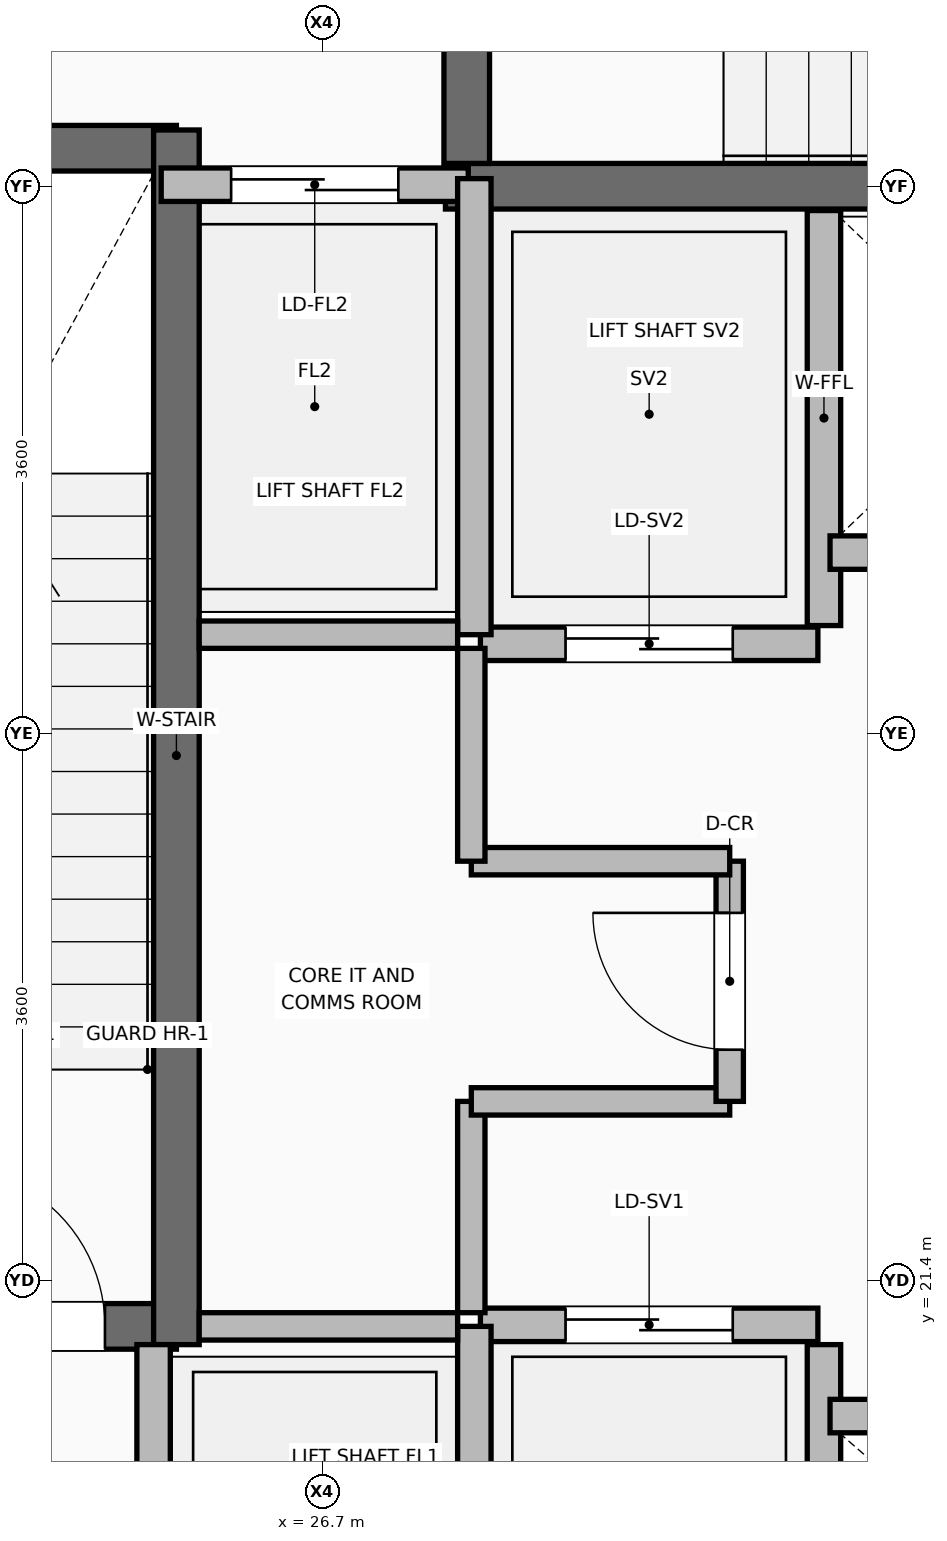
"""IFC4 building model, lengths in metres.
Left out: names, types, materials, properties, quantities, classifications, styles, units other than length and angle.
Written with IfcOpenShell. Run it as: python <this file> out.ifc"""

import sys

from ifc_helpers import new_model, si_unit, direction, frame, frame_2d, origin, place, context, subcontext, project, spatial, rectangle, extrude, element, fill, save


model = new_model("IFC4")
c1 = context("Model", 3, precision=1e-05, world=origin(), true_north=direction((0.0, 1.0)))
c2 = subcontext(c1, "Body", "Model", "MODEL_VIEW")
j1 = project(units=[si_unit("LENGTHUNIT", "METRE"), si_unit("PLANEANGLEUNIT", "RADIAN")], contexts=[c1])
p1 = place(None, origin())
s1 = spatial("IfcSite", under=j1, at=p1, CompositionType="ELEMENT")
p2 = place(p1, origin())
s2 = spatial("IfcBuilding", under=s1, at=p2, CompositionType="ELEMENT")
p3 = place(p2, frame((0.0, 0.0, 175.95)))
s3 = spatial("IfcBuildingStorey", under=s2, at=p3, CompositionType="ELEMENT", Elevation=175.95)
p4 = place(p3, frame((30.0, 18.08, 0.0), z_axis=(0.0, 0.0, 1.0), x_axis=(0.0, 1.0, 0.0)))
e1 = element("IfcWall", 1, at=p4, inside=s3, PredefinedType="PARTITIONING", context=c2, shape_type="SweptSolid", body=[
    extrude(rectangle(XDim=2.9, YDim=0.22, at=frame_2d((1.45, 0.0))), origin(), (0.0, 0.0, 1.0), 5.195),
])
p5 = place(p3, frame((30.0, 25.71, 0.0), z_axis=(0.0, 0.0, 1.0), x_axis=(0.0, 1.0, 0.0)))
e2 = element("IfcWall", 2, at=p5, inside=s3, PredefinedType="PARTITIONING", context=c2, shape_type="SweptSolid", body=[
    extrude(rectangle(XDim=2.73, YDim=0.22, at=frame_2d((1.365, 0.0))), origin(), (0.0, 0.0, 1.0), 5.195),
])
p6 = place(p3, frame((22.175, 21.1, 0.0), z_axis=(0.0, 0.0, 1.0), x_axis=(1.0, 0.0, 0.0)))
e3 = element("IfcWall", 3, at=p6, inside=s3, PredefinedType="SHEAR", context=c2, shape_type="SweptSolid", body=[
    extrude(rectangle(XDim=3.565, YDim=0.3, at=frame_2d((1.782, 0.0))), origin(), (0.0, 0.0, 1.0), 5.22),
])
p7 = place(p6, frame((2.045, 0.0, 0.0)))
e4 = element("IfcOpeningElement", 4, at=p7, cuts=e3, PredefinedType="OPENING", context=c2, shape_type="SweptSolid", body=[
    extrude(rectangle(XDim=1.05, YDim=2.1, at=frame_2d((0.525, 1.05))), frame((0.0, 0.16, 0.0), z_axis=(0.0, -1.0, 0.0), x_axis=(1.0, 0.0, 0.0)), (0.0, 0.0, 1.0), 0.32),
])
p8 = place(p3, frame((22.175, 28.85, 0.0), z_axis=(0.0, 0.0, 1.0), x_axis=(1.0, 0.0, 0.0)))
e5 = element("IfcWall", 5, at=p8, inside=s3, PredefinedType="SHEAR", context=c2, shape_type="SweptSolid", body=[
    extrude(rectangle(XDim=3.565, YDim=0.3, at=frame_2d((1.782, 0.0))), origin(), (0.0, 0.0, 1.0), 5.22),
])
p9 = place(p3, frame((25.74, 20.98, 0.0), z_axis=(0.0, 0.0, 1.0), x_axis=(0.0, 1.0, 0.0)))
e6 = element("IfcWall", 6, at=p9, inside=s3, PredefinedType="SHEAR", context=c2, shape_type="SweptSolid", body=[
    extrude(rectangle(XDim=7.99, YDim=0.3, at=frame_2d((3.995, 0.0))), origin(), (0.0, 0.0, 1.0), 5.22),
])
p10 = place(p3, frame((27.51, 28.6, 0.0), z_axis=(0.0, 0.0, 1.0), x_axis=(1.0, 0.0, 0.0)))
e7 = element("IfcWall", 7, at=p10, inside=s3, PredefinedType="SHEAR", context=c2, shape_type="SweptSolid", body=[
    extrude(rectangle(XDim=8.03, YDim=0.3, at=frame_2d((4.015, 0.0))), origin(), (0.0, 0.0, 1.0), 5.22),
])
p11 = place(p3, frame((27.65, 28.75, 0.0), z_axis=(0.0, 0.0, 1.0), x_axis=(0.0, 1.0, 0.0)))
e8 = element("IfcWall", 8, at=p11, inside=s3, PredefinedType="SHEAR", context=c2, shape_type="SweptSolid", body=[
    extrude(rectangle(XDim=3.425, YDim=0.3, at=frame_2d((1.712, 0.0))), origin(), (0.0, 0.0, 1.0), 5.22),
])
p12 = place(p11, frame((1.0, 0.0, 0.0)))
e9 = element("IfcOpeningElement", 9, at=p12, cuts=e8, PredefinedType="OPENING", context=c2, shape_type="SweptSolid", body=[
    extrude(rectangle(XDim=1.05, YDim=2.1, at=frame_2d((0.525, 1.05))), frame((0.0, 0.16, 0.0), z_axis=(0.0, -1.0, 0.0), x_axis=(1.0, 0.0, 0.0)), (0.0, 0.0, 1.0), 0.32),
])
p13 = place(p3, frame((25.59, 18.22, 0.0), z_axis=(0.0, 0.0, 1.0), x_axis=(0.0, 1.0, 0.0)))
e10 = element("IfcWall", 10, at=p13, inside=s3, PredefinedType="PARTITIONING", context=c2, shape_type="SweptSolid", body=[
    extrude(rectangle(XDim=2.76, YDim=0.22, at=frame_2d((1.38, 0.0))), origin(), (0.0, 0.0, 1.0), 5.2),
])
p14 = place(p13, frame((0.83, 0.0, 0.0)))
e11 = element("IfcOpeningElement", 11, at=p14, cuts=e10, PredefinedType="OPENING", context=c2, shape_type="SweptSolid", body=[
    extrude(rectangle(XDim=1.1, YDim=2.2, at=frame_2d((0.55, 1.1))), frame((0.0, 0.12, 0.0), z_axis=(0.0, -1.0, 0.0), x_axis=(1.0, 0.0, 0.0)), (0.0, 0.0, 1.0), 0.24),
])
p15 = place(p3, frame((25.64, 28.61, 0.0), z_axis=(0.0, 0.0, 1.0), x_axis=(1.0, 0.0, 0.0)))
e12 = element("IfcWall", 12, at=p15, inside=s3, PredefinedType="PARTITIONING", context=c2, shape_type="SweptSolid", body=[
    extrude(rectangle(XDim=2.02, YDim=0.22, at=frame_2d((1.01, 0.0))), origin(), (0.0, 0.0, 1.0), 5.2),
])
p16 = place(p15, frame((0.46, 0.0, 0.0)))
e13 = element("IfcOpeningElement", 13, at=p16, cuts=e12, PredefinedType="OPENING", context=c2, shape_type="SweptSolid", body=[
    extrude(rectangle(XDim=1.1, YDim=2.2, at=frame_2d((0.55, 1.1))), frame((0.0, 0.12, 0.0), z_axis=(0.0, -1.0, 0.0), x_axis=(1.0, 0.0, 0.0)), (0.0, 0.0, 1.0), 0.24),
])
p17 = place(p3, frame((27.74, 21.11, 0.0), z_axis=(0.0, 0.0, 1.0), x_axis=(1.0, 0.0, 0.0)))
e14 = element("IfcWall", 14, at=p17, inside=s3, PredefinedType="PARTITIONING", context=c2, shape_type="SweptSolid", body=[
    extrude(rectangle(XDim=2.22, YDim=0.22, at=frame_2d((1.11, 0.0))), origin(), (0.0, 0.0, 1.0), 5.2),
])
p18 = place(p17, frame((0.56, 0.0, 0.0)))
e15 = element("IfcOpeningElement", 15, at=p18, cuts=e14, PredefinedType="OPENING", context=c2, shape_type="SweptSolid", body=[
    extrude(rectangle(XDim=1.1, YDim=2.2, at=frame_2d((0.55, 1.1))), frame((0.0, 0.12, 0.0), z_axis=(0.0, -1.0, 0.0), x_axis=(1.0, 0.0, 0.0)), (0.0, 0.0, 1.0), 0.24),
])
p19 = place(p3, frame((27.74, 25.59, 0.0), z_axis=(0.0, 0.0, 1.0), x_axis=(1.0, 0.0, 0.0)))
e16 = element("IfcWall", 16, at=p19, inside=s3, PredefinedType="PARTITIONING", context=c2, shape_type="SweptSolid", body=[
    extrude(rectangle(XDim=2.22, YDim=0.22, at=frame_2d((1.11, 0.0))), origin(), (0.0, 0.0, 1.0), 5.2),
])
p20 = place(p19, frame((0.56, 0.0, 0.0)))
e17 = element("IfcOpeningElement", 17, at=p20, cuts=e16, PredefinedType="OPENING", context=c2, shape_type="SweptSolid", body=[
    extrude(rectangle(XDim=1.1, YDim=2.2, at=frame_2d((0.55, 1.1))), frame((0.0, 0.12, 0.0), z_axis=(0.0, -1.0, 0.0), x_axis=(1.0, 0.0, 0.0)), (0.0, 0.0, 1.0), 0.24),
])
p21 = place(p3, frame((30.04, 20.51, 0.0), z_axis=(0.0, 0.0, 1.0), x_axis=(1.0, 0.0, 0.0)))
e18 = element("IfcWall", 18, at=p21, inside=s3, PredefinedType="PARTITIONING", context=c2, shape_type="SweptSolid", body=[
    extrude(rectangle(XDim=2.42, YDim=0.22, at=frame_2d((1.21, 0.0))), origin(), (0.0, 0.0, 1.0), 5.2),
])
p22 = place(p3, frame((30.04, 26.19, 0.0), z_axis=(0.0, 0.0, 1.0), x_axis=(1.0, 0.0, 0.0)))
e19 = element("IfcWall", 19, at=p22, inside=s3, PredefinedType="PARTITIONING", context=c2, shape_type="SweptSolid", body=[
    extrude(rectangle(XDim=2.32, YDim=0.22, at=frame_2d((1.16, 0.0))), origin(), (0.0, 0.0, 1.0), 5.2),
])
p23 = place(p3, frame((27.7, 18.15, 0.0), z_axis=(0.0, 0.0, 1.0), x_axis=(0.0, 1.0, 0.0)))
e20 = element("IfcWall", 20, at=p23, inside=s3, PredefinedType="PARTITIONING", context=c2, shape_type="SweptSolid", body=[
    extrude(rectangle(XDim=2.95, YDim=0.22, at=frame_2d((1.475, 0.0))), origin(), (0.0, 0.0, 1.0), 5.2),
])
p24 = place(p3, frame((27.7, 25.65, 0.0), z_axis=(0.0, 0.0, 1.0), x_axis=(0.0, 1.0, 0.0)))
e21 = element("IfcWall", 21, at=p24, inside=s3, PredefinedType="PARTITIONING", context=c2, shape_type="SweptSolid", body=[
    extrude(rectangle(XDim=3.0, YDim=0.22, at=frame_2d((1.5, 0.0))), origin(), (0.0, 0.0, 1.0), 5.2),
])
for number, where, z_axis, x_axis in (
    (22, (25.89, 21.1, 0.0), (0.0, 0.0, 1.0), (1.0, 0.0, 0.0)),
    (23, (25.89, 25.65, 0.0), (0.0, 0.0, 1.0), (1.0, 0.0, 0.0)),
):
    element("IfcWall", number, at=place(p3, frame(where, z_axis=z_axis, x_axis=x_axis)), inside=s3, PredefinedType="PARTITIONING", context=c2, shape_type="SweptSolid", body=[
        extrude(rectangle(XDim=1.7, YDim=0.18, at=frame_2d((0.85, 0.0))), origin(), (0.0, 0.0, 1.0), 5.2),
    ])
p25 = place(p3, frame((27.68, 21.19, 0.0), z_axis=(0.0, 0.0, 1.0), x_axis=(0.0, 1.0, 0.0)))
e24 = element("IfcWall", 24, at=p25, inside=s3, PredefinedType="PARTITIONING", context=c2, shape_type="SweptSolid", body=[
    extrude(rectangle(XDim=1.39, YDim=0.18, at=frame_2d((0.695, 0.0))), origin(), (0.0, 0.0, 1.0), 5.2),
])
p26 = place(p3, frame((27.68, 22.58, 0.0), z_axis=(0.0, 0.0, 1.0), x_axis=(1.0, 0.0, 0.0)))
e25 = element("IfcWall", 25, at=p26, inside=s3, PredefinedType="PARTITIONING", context=c2, shape_type="SweptSolid", body=[
    extrude(rectangle(XDim=1.7, YDim=0.18, at=frame_2d((0.85, 0.0))), origin(), (0.0, 0.0, 1.0), 5.2),
])
p27 = place(p3, frame((29.38, 22.58, 0.0), z_axis=(0.0, 0.0, 1.0), x_axis=(0.0, 1.0, 0.0)))
e26 = element("IfcWall", 26, at=p27, inside=s3, PredefinedType="PARTITIONING", context=c2, shape_type="SweptSolid", body=[
    extrude(rectangle(XDim=1.58, YDim=0.18, at=frame_2d((0.79, 0.0))), origin(), (0.0, 0.0, 1.0), 5.2),
])
p28 = place(p27, frame((0.34, 0.0, 0.0)))
e27 = element("IfcOpeningElement", 27, at=p28, cuts=e26, PredefinedType="OPENING", context=c2, shape_type="SweptSolid", body=[
    extrude(rectangle(XDim=0.9, YDim=2.1, at=frame_2d((0.45, 1.05))), frame((0.0, 0.1, 0.0), z_axis=(0.0, -1.0, 0.0), x_axis=(1.0, 0.0, 0.0)), (0.0, 0.0, 1.0), 0.2),
])
p29 = place(p3, frame((27.68, 24.16, 0.0), z_axis=(0.0, 0.0, 1.0), x_axis=(1.0, 0.0, 0.0)))
e28 = element("IfcWall", 28, at=p29, inside=s3, PredefinedType="PARTITIONING", context=c2, shape_type="SweptSolid", body=[
    extrude(rectangle(XDim=1.7, YDim=0.18, at=frame_2d((0.85, 0.0))), origin(), (0.0, 0.0, 1.0), 5.2),
])
p30 = place(p3, frame((27.68, 24.16, 0.0), z_axis=(0.0, 0.0, 1.0), x_axis=(0.0, 1.0, 0.0)))
e29 = element("IfcWall", 29, at=p30, inside=s3, PredefinedType="PARTITIONING", context=c2, shape_type="SweptSolid", body=[
    extrude(rectangle(XDim=1.4, YDim=0.18, at=frame_2d((0.7, 0.0))), origin(), (0.0, 0.0, 1.0), 5.2),
])
p31 = place(p7, origin())
e30 = element("IfcDoor", 30, at=p31, inside=s3, OperationType="SINGLE_SWING_LEFT", PredefinedType="DOOR", context=c2, shape_type="SweptSolid", body=[
    extrude(rectangle(XDim=1.05, YDim=2.1, at=frame_2d((0.525, 1.05))), frame((0.0, 0.025, 0.0), z_axis=(0.0, -1.0, 0.0), x_axis=(1.0, 0.0, 0.0)), (0.0, 0.0, 1.0), 0.05),
])
fill(e4, e30)
p32 = place(p16, origin())
e31 = element("IfcDoor", 31, at=p32, inside=s3, OperationType="DOUBLE_DOOR_SLIDING", PredefinedType="DOOR", context=c2, shape_type="SweptSolid", body=[
    extrude(rectangle(XDim=1.1, YDim=2.2, at=frame_2d((0.55, 1.1))), frame((0.0, 0.025, 0.0), z_axis=(0.0, -1.0, 0.0), x_axis=(1.0, 0.0, 0.0)), (0.0, 0.0, 1.0), 0.05),
])
fill(e13, e31)
p33 = place(p18, origin())
e32 = element("IfcDoor", 32, at=p33, inside=s3, OperationType="DOUBLE_DOOR_SLIDING", PredefinedType="DOOR", context=c2, shape_type="SweptSolid", body=[
    extrude(rectangle(XDim=1.1, YDim=2.2, at=frame_2d((0.55, 1.1))), frame((0.0, 0.025, 0.0), z_axis=(0.0, -1.0, 0.0), x_axis=(1.0, 0.0, 0.0)), (0.0, 0.0, 1.0), 0.05),
])
fill(e15, e32)
p34 = place(p20, frame((1.1, 0.0, 0.0), z_axis=(0.0, 0.0, 1.0), x_axis=(-1.0, 0.0, 0.0)))
e33 = element("IfcDoor", 33, at=p34, inside=s3, OperationType="DOUBLE_DOOR_SLIDING", PredefinedType="DOOR", context=c2, shape_type="SweptSolid", body=[
    extrude(rectangle(XDim=1.1, YDim=2.2, at=frame_2d((0.55, 1.1))), frame((0.0, 0.025, 0.0), z_axis=(0.0, -1.0, 0.0), x_axis=(1.0, 0.0, 0.0)), (0.0, 0.0, 1.0), 0.05),
])
fill(e17, e33)
p35 = place(p28, origin())
e34 = element("IfcDoor", 34, at=p35, inside=s3, OperationType="SINGLE_SWING_RIGHT", PredefinedType="DOOR", context=c2, shape_type="SweptSolid", body=[
    extrude(rectangle(XDim=0.9, YDim=2.1, at=frame_2d((0.45, 1.05))), frame((0.0, 0.025, 0.0), z_axis=(0.0, -1.0, 0.0), x_axis=(1.0, 0.0, 0.0)), (0.0, 0.0, 1.0), 0.05),
])
fill(e27, e34)
save(model, sys.argv[1])
